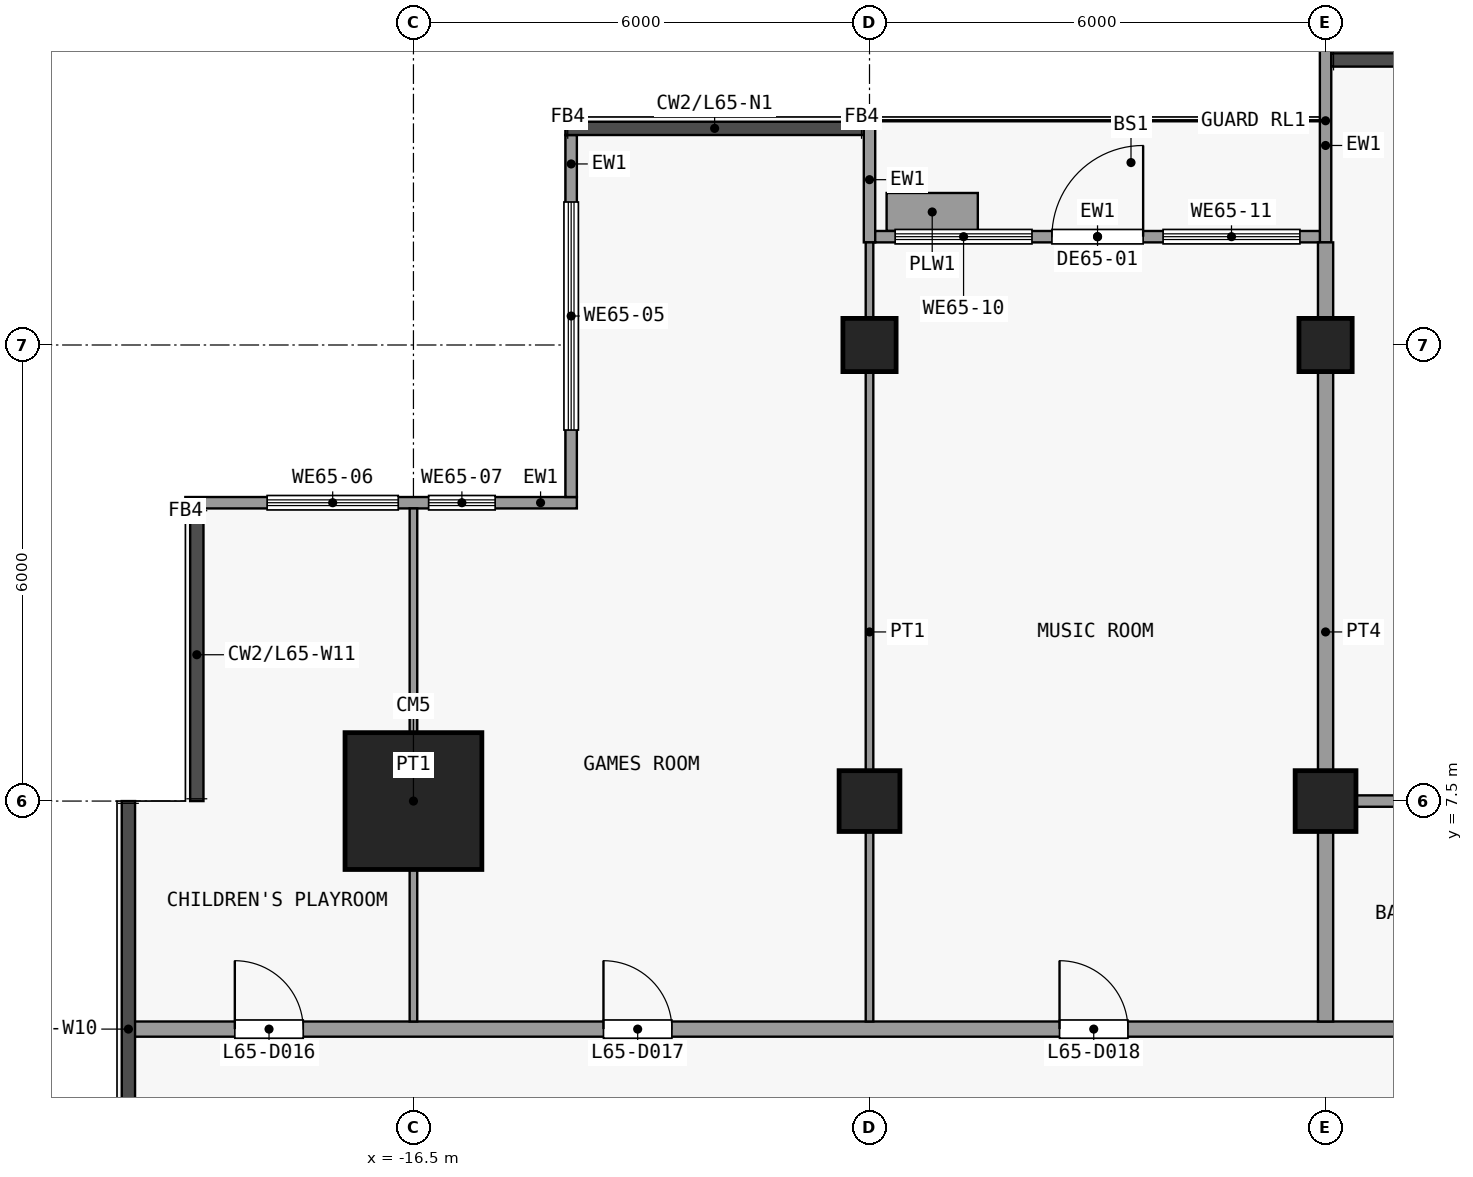
"""IFC4 building model, lengths in metres.
Left out: names, types, materials, properties, quantities, classifications, styles, units other than length and angle.
Written with IfcOpenShell. Run it as: python <this file> out.ifc"""

import sys

from ifc_helpers import new_model, si_unit, direction, frame, frame_2d, origin, origin_2d, place, context, subcontext, project, spatial, rectangle, extrude, element, fill, save


model = new_model("IFC4")
c1 = context("Model", 3, precision=1e-05, world=origin(), true_north=direction((0.0, 1.0)))
c2 = subcontext(c1, "Body", "Model", "MODEL_VIEW")
j1 = project(units=[si_unit("LENGTHUNIT", "METRE"), si_unit("PLANEANGLEUNIT", "RADIAN")], contexts=[c1])
p1 = place(None, origin())
s1 = spatial("IfcSite", under=j1, at=p1, CompositionType="ELEMENT")
p2 = place(p1, origin())
s2 = spatial("IfcBuilding", under=s1, at=p2, CompositionType="ELEMENT")
p3 = place(p2, frame((0.0, 0.0, 259.1)))
s3 = spatial("IfcBuildingStorey", under=s2, at=p3, CompositionType="ELEMENT", Elevation=259.1)
p4 = place(p3, frame((-16.5, 7.5, 0.0), z_axis=(0.0, 0.0, 1.0), x_axis=(1.0, 0.0, 0.0)))
e1 = element("IfcColumn", 1, at=p4, inside=s3, PredefinedType="COLUMN", context=c2, shape_type="SweptSolid", body=[
    extrude(rectangle(XDim=1.8, YDim=1.8, at=origin_2d()), origin(), (0.0, 0.0, 1.0), 3.6),
])
p5 = place(p3, frame((-10.5, 7.5, 0.0), z_axis=(0.0, 0.0, 1.0), x_axis=(1.0, 0.0, 0.0)))
e2 = element("IfcColumn", 2, at=p5, inside=s3, PredefinedType="COLUMN", context=c2, shape_type="SweptSolid", body=[
    extrude(rectangle(XDim=0.8, YDim=0.8, at=origin_2d()), origin(), (0.0, 0.0, 1.0), 3.6),
])
p6 = place(p3, frame((-10.5, 13.5, 0.0), z_axis=(0.0, 0.0, 1.0), x_axis=(1.0, 0.0, 0.0)))
e3 = element("IfcColumn", 3, at=p6, inside=s3, PredefinedType="COLUMN", context=c2, shape_type="SweptSolid", body=[
    extrude(rectangle(XDim=0.7, YDim=0.7, at=origin_2d()), origin(), (0.0, 0.0, 1.0), 3.6),
])
p7 = place(p3, frame((-4.5, 7.5, 0.0), z_axis=(0.0, 0.0, 1.0), x_axis=(1.0, 0.0, 0.0)))
e4 = element("IfcColumn", 4, at=p7, inside=s3, PredefinedType="COLUMN", context=c2, shape_type="SweptSolid", body=[
    extrude(rectangle(XDim=0.8, YDim=0.8, at=origin_2d()), origin(), (0.0, 0.0, 1.0), 3.6),
])
p8 = place(p3, frame((-4.5, 13.5, 0.0), z_axis=(0.0, 0.0, 1.0), x_axis=(1.0, 0.0, 0.0)))
e5 = element("IfcColumn", 5, at=p8, inside=s3, PredefinedType="COLUMN", context=c2, shape_type="SweptSolid", body=[
    extrude(rectangle(XDim=0.7, YDim=0.7, at=origin_2d()), origin(), (0.0, 0.0, 1.0), 3.6),
])
p9 = place(p3, frame((-14.425, 11.5, 0.0), z_axis=(0.0, 0.0, 1.0), x_axis=(0.0, 1.0, 0.0)))
e6 = element("IfcWall", 6, at=p9, inside=s3, PredefinedType="SOLIDWALL", context=c2, shape_type="SweptSolid", body=[
    extrude(rectangle(XDim=4.762, YDim=0.15, at=frame_2d((2.381, 0.0))), origin(), (0.0, 0.0, 1.0), 3.3),
])
p10 = place(p9, frame((0.881, 0.0, 0.9)))
e7 = element("IfcOpeningElement", 7, at=p10, cuts=e6, PredefinedType="OPENING", context=c2, shape_type="SweptSolid", body=[
    extrude(rectangle(XDim=3.0, YDim=2.4, at=frame_2d((1.5, 1.2))), frame((0.0, 0.085, 0.0), z_axis=(0.0, -1.0, 0.0), x_axis=(1.0, 0.0, 0.0)), (0.0, 0.0, 1.0), 0.17),
])
p11 = place(p3, frame((-19.5, 11.425, 0.0), z_axis=(0.0, 0.0, 1.0), x_axis=(1.0, 0.0, 0.0)))
e8 = element("IfcWall", 8, at=p11, inside=s3, PredefinedType="SOLIDWALL", context=c2, shape_type="SweptSolid", body=[
    extrude(rectangle(XDim=5.15, YDim=0.15, at=frame_2d((2.575, 0.0))), origin(), (0.0, 0.0, 1.0), 3.3),
])
p12 = place(p11, frame((1.075, 0.0, 0.9)))
e9 = element("IfcOpeningElement", 9, at=p12, cuts=e8, PredefinedType="OPENING", context=c2, shape_type="SweptSolid", body=[
    extrude(rectangle(XDim=1.725, YDim=2.4, at=frame_2d((0.863, 1.2))), frame((0.0, 0.085, 0.0), z_axis=(0.0, -1.0, 0.0), x_axis=(1.0, 0.0, 0.0)), (0.0, 0.0, 1.0), 0.17),
])
p13 = place(p11, frame((3.2, 0.0, 0.9)))
e10 = element("IfcOpeningElement", 10, at=p13, cuts=e8, PredefinedType="OPENING", context=c2, shape_type="SweptSolid", body=[
    extrude(rectangle(XDim=0.875, YDim=2.4, at=frame_2d((0.438, 1.2))), frame((0.0, 0.085, 0.0), z_axis=(0.0, -1.0, 0.0), x_axis=(1.0, 0.0, 0.0)), (0.0, 0.0, 1.0), 0.17),
])
p14 = place(p3, frame((-10.5, 14.85, 0.0), z_axis=(0.0, 0.0, 1.0), x_axis=(0.0, 1.0, 0.0)))
e11 = element("IfcWall", 11, at=p14, inside=s3, PredefinedType="SOLIDWALL", context=c2, shape_type="SweptSolid", body=[
    extrude(rectangle(XDim=1.65, YDim=0.15, at=frame_2d((0.825, 0.0))), origin(), (0.0, 0.0, 1.0), 3.3),
])
p15 = place(p3, frame((-4.5, 14.85, 0.0), z_axis=(0.0, 0.0, 1.0), x_axis=(0.0, 1.0, 0.0)))
e12 = element("IfcWall", 12, at=p15, inside=s3, PredefinedType="SOLIDWALL", context=c2, shape_type="SweptSolid", body=[
    extrude(rectangle(XDim=2.55, YDim=0.15, at=frame_2d((1.275, 0.0))), origin(), (0.0, 0.0, 1.0), 3.3),
])
p16 = place(p3, frame((-10.425, 14.925, 0.0), z_axis=(0.0, 0.0, 1.0), x_axis=(1.0, 0.0, 0.0)))
e13 = element("IfcWall", 13, at=p16, inside=s3, PredefinedType="SOLIDWALL", context=c2, shape_type="SweptSolid", body=[
    extrude(rectangle(XDim=5.85, YDim=0.15, at=frame_2d((2.925, 0.0))), origin(), (0.0, 0.0, 1.0), 3.3),
])
p17 = place(p16, frame((2.325, 0.0, 0.0)))
e14 = element("IfcOpeningElement", 14, at=p17, cuts=e13, PredefinedType="OPENING", context=c2, shape_type="SweptSolid", body=[
    extrude(rectangle(XDim=1.2, YDim=2.4, at=frame_2d((0.6, 1.2))), frame((0.0, 0.085, 0.0), z_axis=(0.0, -1.0, 0.0), x_axis=(1.0, 0.0, 0.0)), (0.0, 0.0, 1.0), 0.17),
])
p18 = place(p16, frame((0.262, 0.0, 0.9)))
e15 = element("IfcOpeningElement", 15, at=p18, cuts=e13, PredefinedType="OPENING", context=c2, shape_type="SweptSolid", body=[
    extrude(rectangle(XDim=1.8, YDim=2.1, at=frame_2d((0.9, 1.05))), frame((0.0, 0.085, 0.0), z_axis=(0.0, -1.0, 0.0), x_axis=(1.0, 0.0, 0.0)), (0.0, 0.0, 1.0), 0.17),
])
p19 = place(p16, frame((3.788, 0.0, 0.9)))
e16 = element("IfcOpeningElement", 16, at=p19, cuts=e13, PredefinedType="OPENING", context=c2, shape_type="SweptSolid", body=[
    extrude(rectangle(XDim=1.8, YDim=2.1, at=frame_2d((0.9, 1.05))), frame((0.0, 0.085, 0.0), z_axis=(0.0, -1.0, 0.0), x_axis=(1.0, 0.0, 0.0)), (0.0, 0.0, 1.0), 0.17),
])
p20 = place(p3, frame((-10.275, 15.25, 0.0), z_axis=(0.0, 0.0, 1.0), x_axis=(1.0, 0.0, 0.0)))
e17 = element("IfcWall", 17, at=p20, inside=s3, PredefinedType="USERDEFINED", context=c2, shape_type="SweptSolid", body=[
    extrude(rectangle(XDim=1.2, YDim=0.5, at=frame_2d((0.6, 0.0))), origin(), (0.0, 0.0, 1.0), 0.9),
])
p21 = place(p3, frame((-20.25, 4.5, 0.0), z_axis=(0.0, 0.0, 1.0), x_axis=(1.0, 0.0, 0.0)))
e18 = element("IfcWall", 18, at=p21, inside=s3, PredefinedType="PARTITIONING", context=c2, shape_type="SweptSolid", body=[
    extrude(rectangle(XDim=38.1, YDim=0.2, at=frame_2d((19.05, 0.0))), origin(), (0.0, 0.0, 1.0), 3.3),
])
p22 = place(p21, frame((1.4, 0.0, 0.0)))
e19 = element("IfcOpeningElement", 19, at=p22, cuts=e18, PredefinedType="OPENING", context=c2, shape_type="SweptSolid", body=[
    extrude(rectangle(XDim=0.9, YDim=2.1, at=frame_2d((0.45, 1.05))), frame((0.0, 0.11, 0.0), z_axis=(0.0, -1.0, 0.0), x_axis=(1.0, 0.0, 0.0)), (0.0, 0.0, 1.0), 0.22),
])
p23 = place(p21, frame((6.25, 0.0, 0.0)))
e20 = element("IfcOpeningElement", 20, at=p23, cuts=e18, PredefinedType="OPENING", context=c2, shape_type="SweptSolid", body=[
    extrude(rectangle(XDim=0.9, YDim=2.1, at=frame_2d((0.45, 1.05))), frame((0.0, 0.11, 0.0), z_axis=(0.0, -1.0, 0.0), x_axis=(1.0, 0.0, 0.0)), (0.0, 0.0, 1.0), 0.22),
])
p24 = place(p21, frame((12.25, 0.0, 0.0)))
e21 = element("IfcOpeningElement", 21, at=p24, cuts=e18, PredefinedType="OPENING", context=c2, shape_type="SweptSolid", body=[
    extrude(rectangle(XDim=0.9, YDim=2.1, at=frame_2d((0.45, 1.05))), frame((0.0, 0.11, 0.0), z_axis=(0.0, -1.0, 0.0), x_axis=(1.0, 0.0, 0.0)), (0.0, 0.0, 1.0), 0.22),
])
p25 = place(p21, frame((18.95, 0.0, 0.0)))
e22 = element("IfcOpeningElement", 22, at=p25, cuts=e18, PredefinedType="OPENING", context=c2, shape_type="SweptSolid", body=[
    extrude(rectangle(XDim=1.0, YDim=2.1, at=frame_2d((0.5, 1.05))), frame((0.0, 0.11, 0.0), z_axis=(0.0, -1.0, 0.0), x_axis=(1.0, 0.0, 0.0)), (0.0, 0.0, 1.0), 0.22),
])
p26 = place(p3, frame((-4.4, 7.5, 0.0), z_axis=(0.0, 0.0, 1.0), x_axis=(1.0, 0.0, 0.0)))
e23 = element("IfcWall", 23, at=p26, inside=s3, PredefinedType="PARTITIONING", context=c2, shape_type="SweptSolid", body=[
    extrude(rectangle(XDim=2.4, YDim=0.15, at=frame_2d((1.2, 0.0))), origin(), (0.0, 0.0, 1.0), 3.3),
])
p27 = place(p3, frame((-16.5, 4.6, 0.0), z_axis=(0.0, 0.0, 1.0), x_axis=(0.0, 1.0, 0.0)))
e24 = element("IfcWall", 24, at=p27, inside=s3, PredefinedType="PARTITIONING", context=c2, shape_type="SweptSolid", body=[
    extrude(rectangle(XDim=6.75, YDim=0.1, at=frame_2d((3.375, 0.0))), origin(), (0.0, 0.0, 1.0), 3.3),
])
p28 = place(p3, frame((-10.5, 4.6, 0.0), z_axis=(0.0, 0.0, 1.0), x_axis=(0.0, 1.0, 0.0)))
e25 = element("IfcWall", 25, at=p28, inside=s3, PredefinedType="PARTITIONING", context=c2, shape_type="SweptSolid", body=[
    extrude(rectangle(XDim=10.25, YDim=0.1, at=frame_2d((5.125, 0.0))), origin(), (0.0, 0.0, 1.0), 3.3),
])
p29 = place(p3, frame((-4.5, 4.6, 0.0), z_axis=(0.0, 0.0, 1.0), x_axis=(0.0, 1.0, 0.0)))
e26 = element("IfcWall", 26, at=p29, inside=s3, PredefinedType="PARTITIONING", context=c2, shape_type="SweptSolid", body=[
    extrude(rectangle(XDim=10.25, YDim=0.2, at=frame_2d((5.125, 0.0))), origin(), (0.0, 0.0, 1.0), 3.3),
])
p30 = place(p10, origin())
e27 = element("IfcWindow", 27, at=p30, inside=s3, PartitioningType="SINGLE_PANEL", PredefinedType="WINDOW", context=c2, shape_type="SweptSolid", body=[
    extrude(rectangle(XDim=3.0, YDim=2.4, at=frame_2d((1.5, 1.2))), frame((0.0, 0.03, 0.0), z_axis=(0.0, -1.0, 0.0), x_axis=(1.0, 0.0, 0.0)), (0.0, 0.0, 1.0), 0.06),
])
fill(e7, e27)
p31 = place(p12, origin())
e28 = element("IfcWindow", 28, at=p31, inside=s3, PartitioningType="SINGLE_PANEL", PredefinedType="WINDOW", context=c2, shape_type="SweptSolid", body=[
    extrude(rectangle(XDim=1.725, YDim=2.4, at=frame_2d((0.863, 1.2))), frame((0.0, 0.03, 0.0), z_axis=(0.0, -1.0, 0.0), x_axis=(1.0, 0.0, 0.0)), (0.0, 0.0, 1.0), 0.06),
])
fill(e9, e28)
p32 = place(p13, origin())
e29 = element("IfcWindow", 29, at=p32, inside=s3, PartitioningType="SINGLE_PANEL", PredefinedType="WINDOW", context=c2, shape_type="SweptSolid", body=[
    extrude(rectangle(XDim=0.875, YDim=2.4, at=frame_2d((0.438, 1.2))), frame((0.0, 0.03, 0.0), z_axis=(0.0, -1.0, 0.0), x_axis=(1.0, 0.0, 0.0)), (0.0, 0.0, 1.0), 0.06),
])
fill(e10, e29)
p33 = place(p17, origin())
e30 = element("IfcDoor", 30, at=p33, inside=s3, OperationType="SINGLE_SWING_RIGHT", PredefinedType="DOOR", context=c2, shape_type="SweptSolid", body=[
    extrude(rectangle(XDim=1.2, YDim=2.4, at=frame_2d((0.6, 1.2))), frame((0.0, 0.025, 0.0), z_axis=(0.0, -1.0, 0.0), x_axis=(1.0, 0.0, 0.0)), (0.0, 0.0, 1.0), 0.05),
])
fill(e14, e30)
p34 = place(p18, origin())
e31 = element("IfcWindow", 31, at=p34, inside=s3, PartitioningType="SINGLE_PANEL", PredefinedType="WINDOW", context=c2, shape_type="SweptSolid", body=[
    extrude(rectangle(XDim=1.8, YDim=2.1, at=frame_2d((0.9, 1.05))), frame((0.0, 0.03, 0.0), z_axis=(0.0, -1.0, 0.0), x_axis=(1.0, 0.0, 0.0)), (0.0, 0.0, 1.0), 0.06),
])
fill(e15, e31)
p35 = place(p19, origin())
e32 = element("IfcWindow", 32, at=p35, inside=s3, PartitioningType="SINGLE_PANEL", PredefinedType="WINDOW", context=c2, shape_type="SweptSolid", body=[
    extrude(rectangle(XDim=1.8, YDim=2.1, at=frame_2d((0.9, 1.05))), frame((0.0, 0.03, 0.0), z_axis=(0.0, -1.0, 0.0), x_axis=(1.0, 0.0, 0.0)), (0.0, 0.0, 1.0), 0.06),
])
fill(e16, e32)
p36 = place(p22, origin())
e33 = element("IfcDoor", 33, at=p36, inside=s3, OperationType="SINGLE_SWING_RIGHT", PredefinedType="DOOR", context=c2, shape_type="SweptSolid", body=[
    extrude(rectangle(XDim=0.9, YDim=2.1, at=frame_2d((0.45, 1.05))), frame((0.0, 0.025, 0.0), z_axis=(0.0, -1.0, 0.0), x_axis=(1.0, 0.0, 0.0)), (0.0, 0.0, 1.0), 0.05),
])
fill(e19, e33)
p37 = place(p23, origin())
e34 = element("IfcDoor", 34, at=p37, inside=s3, OperationType="SINGLE_SWING_RIGHT", PredefinedType="DOOR", context=c2, shape_type="SweptSolid", body=[
    extrude(rectangle(XDim=0.9, YDim=2.1, at=frame_2d((0.45, 1.05))), frame((0.0, 0.025, 0.0), z_axis=(0.0, -1.0, 0.0), x_axis=(1.0, 0.0, 0.0)), (0.0, 0.0, 1.0), 0.05),
])
fill(e20, e34)
p38 = place(p24, origin())
e35 = element("IfcDoor", 35, at=p38, inside=s3, OperationType="SINGLE_SWING_RIGHT", PredefinedType="DOOR", context=c2, shape_type="SweptSolid", body=[
    extrude(rectangle(XDim=0.9, YDim=2.1, at=frame_2d((0.45, 1.05))), frame((0.0, 0.025, 0.0), z_axis=(0.0, -1.0, 0.0), x_axis=(1.0, 0.0, 0.0)), (0.0, 0.0, 1.0), 0.05),
])
fill(e21, e35)
save(model, sys.argv[1])
